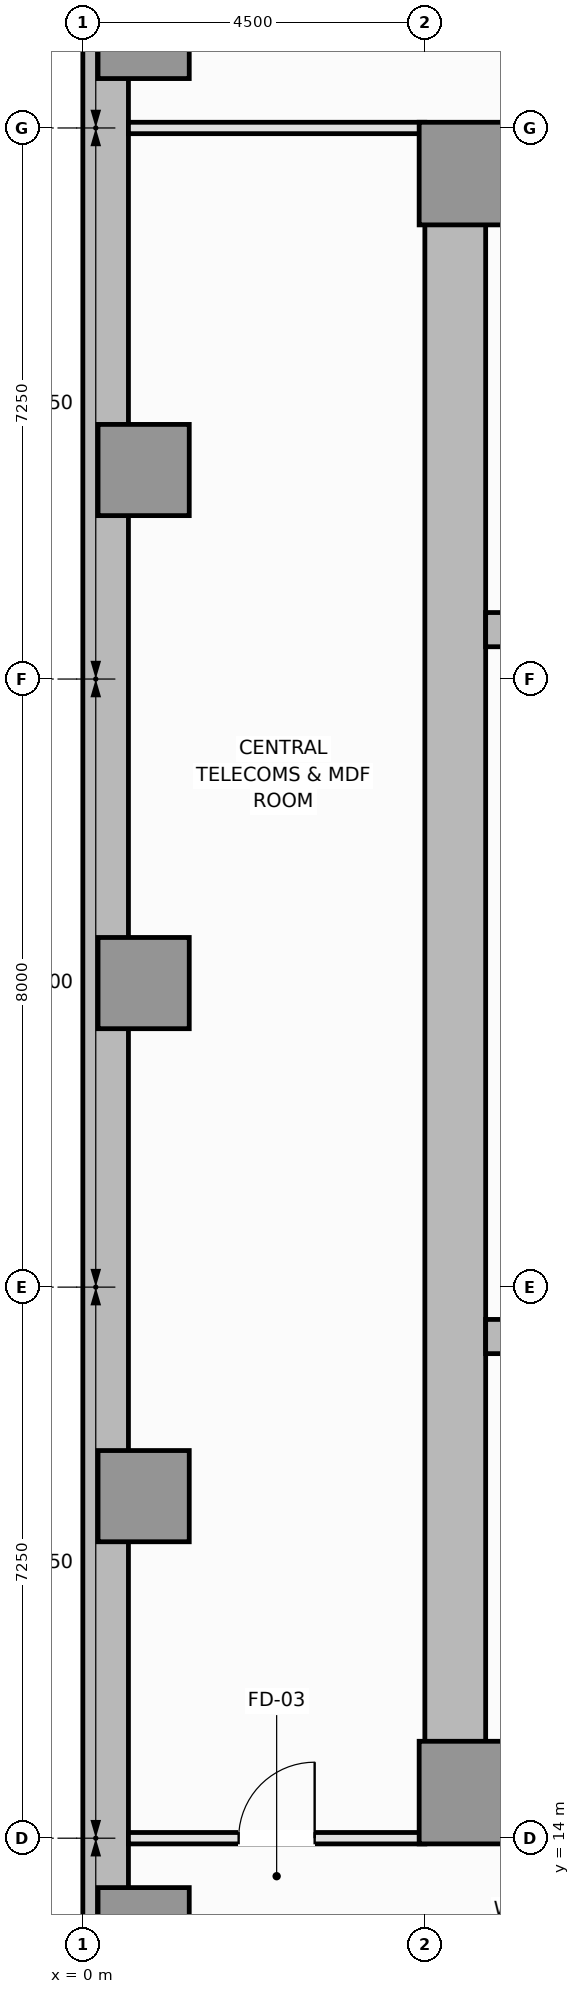
"""IFC4 building model, lengths in metres.
Left out: names, types, materials, properties, quantities, classifications, styles, units other than length and angle.
Written with IfcOpenShell. Run it as: python <this file> out.ifc"""

import sys

from ifc_helpers import new_model, si_unit, direction, frame, frame_2d, origin, origin_2d, place, context, subcontext, project, spatial, rectangle, extrude, element, fill, save


model = new_model("IFC4")
c1 = context("Model", 3, precision=1e-05, world=origin(), true_north=direction((0.0, 1.0)))
c2 = subcontext(c1, "Body", "Model", "MODEL_VIEW")
j1 = project(units=[si_unit("LENGTHUNIT", "METRE"), si_unit("PLANEANGLEUNIT", "RADIAN")], contexts=[c1])
p1 = place(None, origin())
s1 = spatial("IfcSite", under=j1, at=p1, CompositionType="ELEMENT")
p2 = place(p1, origin())
s2 = spatial("IfcBuilding", under=s1, at=p2, CompositionType="ELEMENT")
p3 = place(p2, frame((0.0, 0.0, -4.8)))
s3 = spatial("IfcBuildingStorey", under=s2, at=p3, CompositionType="ELEMENT", Elevation=-4.8)
p4 = place(p3, frame((0.3, 0.6, 0.0), z_axis=(0.0, 0.0, 1.0), x_axis=(0.0, 1.0, 0.0)))
e1 = element("IfcWall", 1, at=p4, inside=s3, PredefinedType="USERDEFINED", context=c2, shape_type="SweptSolid", body=[
    extrude(rectangle(XDim=49.3, YDim=0.6, at=frame_2d((24.65, 0.0))), origin(), (0.0, 0.0, 1.0), 4.8),
])
for number, where, z_axis, x_axis in (
    (2, (4.5, 14.4, 0.0), (0.0, 0.0, 1.0), (1.0, 0.0, 0.0)),
    (3, (4.5, 36.1, 0.0), (0.0, 0.0, 1.0), (1.0, 0.0, 0.0)),
):
    element("IfcWall", number, at=place(p3, frame(where, z_axis=z_axis, x_axis=x_axis)), inside=s3, PredefinedType="SHEAR", context=c2, shape_type="SweptSolid", body=[
        extrude(rectangle(XDim=13.5, YDim=0.8, at=frame_2d((6.75, 0.0))), origin(), (0.0, 0.0, 1.0), 4.8),
    ])
p5 = place(p3, frame((4.9, 14.8, 0.0), z_axis=(0.0, 0.0, 1.0), x_axis=(0.0, 1.0, 0.0)))
e4 = element("IfcWall", 4, at=p5, inside=s3, PredefinedType="SHEAR", context=c2, shape_type="SweptSolid", body=[
    extrude(rectangle(XDim=20.9, YDim=0.8, at=frame_2d((10.45, 0.0))), origin(), (0.0, 0.0, 1.0), 4.8),
])
for number, where, z_axis, x_axis in (
    (5, (5.3, 20.6, 0.0), (0.0, 0.0, 1.0), (1.0, 0.0, 0.0)),
    (6, (5.3, 29.9, 0.0), (0.0, 0.0, 1.0), (1.0, 0.0, 0.0)),
):
    element("IfcWall", number, at=place(p3, frame(where, z_axis=z_axis, x_axis=x_axis)), inside=s3, PredefinedType="SHEAR", context=c2, shape_type="SweptSolid", body=[
        extrude(rectangle(XDim=11.9, YDim=0.45, at=frame_2d((5.95, 0.0))), origin(), (0.0, 0.0, 1.0), 4.8),
    ])
for number, where, z_axis, x_axis in (
    (7, (5.1, 14.6, 0.0), (0.0, 0.0, 1.0), (1.0, 0.0, 0.0)),
    (8, (5.1, 35.9, 0.0), (0.0, 0.0, 1.0), (1.0, 0.0, 0.0)),
):
    element("IfcColumn", number, at=place(p3, frame(where, z_axis=z_axis, x_axis=x_axis)), inside=s3, PredefinedType="PILASTER", context=c2, shape_type="SweptSolid", body=[
        extrude(rectangle(XDim=1.35, YDim=1.35, at=origin_2d()), origin(), (0.0, 0.0, 1.0), 4.8),
    ])
for number, where, z_axis, x_axis in (
    (9, (0.8, 12.75, 0.0), (0.0, 0.0, 1.0), (1.0, 0.0, 0.0)),
    (10, (0.8, 18.5, 0.0), (0.0, 0.0, 1.0), (1.0, 0.0, 0.0)),
    (11, (0.8, 25.25, 0.0), (0.0, 0.0, 1.0), (1.0, 0.0, 0.0)),
    (12, (0.8, 32.0, 0.0), (0.0, 0.0, 1.0), (1.0, 0.0, 0.0)),
    (13, (0.8, 37.75, 0.0), (0.0, 0.0, 1.0), (1.0, 0.0, 0.0)),
):
    element("IfcColumn", number, at=place(p3, frame(where, z_axis=z_axis, x_axis=x_axis)), inside=s3, PredefinedType="COLUMN", context=c2, shape_type="SweptSolid", body=[
        extrude(rectangle(XDim=1.2, YDim=1.2, at=origin_2d()), origin(), (0.0, 0.0, 1.0), 4.8),
    ])
p6 = place(p3, frame((0.6, 14.0, 0.0), z_axis=(0.0, 0.0, 1.0), x_axis=(1.0, 0.0, 0.0)))
e14 = element("IfcWall", 14, at=p6, inside=s3, PredefinedType="PARTITIONING", context=c2, shape_type="SweptSolid", body=[
    extrude(rectangle(XDim=3.9, YDim=0.15, at=frame_2d((1.95, 0.0))), origin(), (0.0, 0.0, 1.0), 4.6),
])
p7 = place(p6, frame((1.45, 0.0, 0.0)))
e15 = element("IfcOpeningElement", 15, at=p7, cuts=e14, PredefinedType="OPENING", context=c2, shape_type="SweptSolid", body=[
    extrude(rectangle(XDim=1.0, YDim=2.15, at=frame_2d((0.5, 1.075))), frame((0.0, 0.085, 0.0), z_axis=(0.0, -1.0, 0.0), x_axis=(1.0, 0.0, 0.0)), (0.0, 0.0, 1.0), 0.17),
])
p8 = place(p3, frame((0.6, 36.5, 0.0), z_axis=(0.0, 0.0, 1.0), x_axis=(1.0, 0.0, 0.0)))
e16 = element("IfcWall", 16, at=p8, inside=s3, PredefinedType="PARTITIONING", context=c2, shape_type="SweptSolid", body=[
    extrude(rectangle(XDim=3.9, YDim=0.15, at=frame_2d((1.95, 0.0))), origin(), (0.0, 0.0, 1.0), 4.6),
])
p9 = place(p7, origin())
e17 = element("IfcDoor", 17, at=p9, inside=s3, OperationType="SINGLE_SWING_RIGHT", PredefinedType="DOOR", context=c2, shape_type="SweptSolid", body=[
    extrude(rectangle(XDim=1.0, YDim=2.15, at=frame_2d((0.5, 1.075))), frame((0.0, 0.025, 0.0), z_axis=(0.0, -1.0, 0.0), x_axis=(1.0, 0.0, 0.0)), (0.0, 0.0, 1.0), 0.05),
])
fill(e15, e17)
save(model, sys.argv[1])
